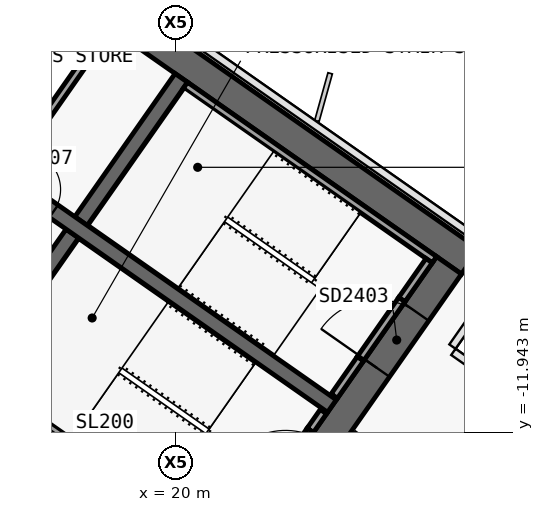
"""IFC4 building model, lengths in metres.
Left out: names, types, materials, properties, quantities, classifications, styles, units other than length and angle.
Written with IfcOpenShell. Run it as: python <this file> out.ifc"""

import sys

from ifc_helpers import new_model, si_unit, direction, frame, frame_2d, origin, place, context, subcontext, project, spatial, polyline, rectangle, outline, extrude, element, fill, save


model = new_model("IFC4")
c1 = context("Model", 3, precision=1e-05, world=origin(), true_north=direction((0.0, 1.0)))
c2 = subcontext(c1, "Body", "Model", "MODEL_VIEW")
j1 = project(units=[si_unit("LENGTHUNIT", "METRE"), si_unit("PLANEANGLEUNIT", "RADIAN")], contexts=[c1])
p1 = place(None, origin())
s1 = spatial("IfcSite", under=j1, at=p1, CompositionType="ELEMENT")
p2 = place(p1, origin())
s2 = spatial("IfcBuilding", under=s1, at=p2, CompositionType="ELEMENT")
p3 = place(p2, frame((0.0, 0.0, 135.9)))
s3 = spatial("IfcBuildingStorey", under=s2, at=p3, CompositionType="ELEMENT", Elevation=135.9)
p4 = place(p3, frame((-0.029, 11.984, 0.0), z_axis=(0.0, 0.0, 1.0), x_axis=(0.819151382952, -0.573577380837, 0.0)))
e1 = element("IfcWall", 1, at=p4, inside=s3, PredefinedType="SHEAR", context=c2, shape_type="SweptSolid", body=[
    extrude(outline(polyline([(33.898, 0.4), (-0.0, 0.4), (0.56, -0.4), (33.898, -0.4), (33.898, 0.4)])), origin(), (0.0, 0.0, 1.0), 3.9),
])
p5 = place(p3, frame((-0.029, -0.712, 0.0), z_axis=(0.0, 0.0, 1.0), x_axis=(0.819151758019, -0.573576845187, 0.0)))
e2 = element("IfcWall", 2, at=p5, inside=s3, PredefinedType="SHEAR", context=c2, shape_type="SweptSolid", body=[
    extrude(outline(polyline([(26.616, 0.4), (-0.0, 0.4), (0.56, -0.4), (26.616, -0.4), (26.616, 0.4)])), origin(), (0.0, 0.0, 1.0), 3.9),
])
p6 = place(p5, frame((1.166, 0.0, 0.0)))
e3 = element("IfcOpeningElement", 3, at=p6, cuts=e2, PredefinedType="OPENING", context=c2, shape_type="SweptSolid", body=[
    extrude(rectangle(XDim=1.5, YDim=2.1, at=frame_2d((0.75, 1.05))), frame((0.0, 0.41, 0.0), z_axis=(0.0, -1.0, 0.0), x_axis=(1.0, 0.0, 0.0)), (0.0, 0.0, 1.0), 0.82),
])
p7 = place(p5, frame((12.366, 0.0, 0.0)))
e4 = element("IfcOpeningElement", 4, at=p7, cuts=e2, PredefinedType="OPENING", context=c2, shape_type="SweptSolid", body=[
    extrude(rectangle(XDim=1.5, YDim=2.1, at=frame_2d((0.75, 1.05))), frame((0.0, 0.41, 0.0), z_axis=(0.0, -1.0, 0.0), x_axis=(1.0, 0.0, 0.0)), (0.0, 0.0, 1.0), 0.82),
])
p8 = place(p3, frame((21.675, -15.421, 0.0), z_axis=(0.0, 0.0, 1.0), x_axis=(0.573581815061, 0.819148278049, 0.0)))
e5 = element("IfcWall", 5, at=p8, inside=s3, PredefinedType="SHEAR", context=c2, shape_type="SweptSolid", body=[
    extrude(outline(polyline([(9.6, 0.4), (0.0, 0.4), (0.0, -0.4), (9.6, -0.4), (9.6, 0.4)])), origin(), (0.0, 0.0, 1.0), 3.9),
])
p9 = place(p8, frame((6.3, 0.0, 0.0)))
e6 = element("IfcOpeningElement", 6, at=p9, cuts=e5, PredefinedType="OPENING", context=c2, shape_type="SweptSolid", body=[
    extrude(rectangle(XDim=1.8, YDim=2.1, at=frame_2d((0.9, 1.05))), frame((0.0, 0.41, 0.0), z_axis=(0.0, -1.0, 0.0), x_axis=(1.0, 0.0, 0.0)), (0.0, 0.0, 1.0), 0.82),
])
p10 = place(p8, frame((2.1, 0.0, 0.0)))
e7 = element("IfcOpeningElement", 7, at=p10, cuts=e5, PredefinedType="OPENING", context=c2, shape_type="SweptSolid", body=[
    extrude(rectangle(XDim=1.8, YDim=2.1, at=frame_2d((0.9, 1.05))), frame((0.0, 0.41, 0.0), z_axis=(0.0, -1.0, 0.0), x_axis=(1.0, 0.0, 0.0)), (0.0, 0.0, 1.0), 0.82),
])
p11 = place(p3, frame((14.63, -10.488, 0.0), z_axis=(0.0, 0.0, 1.0), x_axis=(0.573611936273, 0.819127185829, 0.0)))
e8 = element("IfcWall", 8, at=p11, inside=s3, PredefinedType="SHEAR", context=c2, shape_type="SweptSolid", body=[
    extrude(outline(polyline([(0.0, 0.2), (0.0, -0.2), (4.6, -0.2), (4.6, 0.2), (0.0, 0.2)])), origin(), (0.0, 0.0, 1.0), 3.9),
])
p12 = place(p3, frame((17.498, -6.392, 0.0), z_axis=(0.0, 0.0, 1.0), x_axis=(0.573611936273, 0.819127185829, 0.0)))
e9 = element("IfcWall", 9, at=p12, inside=s3, PredefinedType="SHEAR", context=c2, shape_type="SweptSolid", body=[
    extrude(outline(polyline([(4.6, -0.2), (4.6, 0.2), (0.0, 0.2), (0.0, -0.2), (4.6, -0.2)])), origin(), (0.0, 0.0, 1.0), 3.9),
])
p13 = place(p3, frame((2.638, 3.768, 0.0), z_axis=(0.0, 0.0, 1.0), x_axis=(0.81915267502, -0.573575535572, 0.0)))
e10 = element("IfcWall", 10, at=p13, inside=s3, PredefinedType="SHEAR", context=c2, shape_type="SweptSolid", body=[
    extrude(outline(polyline([(0.0, 0.2), (0.0, -0.2), (26.2, -0.2), (26.2, 0.2), (0.0, 0.2)])), origin(), (0.0, 0.0, 1.0), 3.9),
])
p14 = place(p13, frame((9.637, 0.0, 0.0)))
e11 = element("IfcOpeningElement", 11, at=p14, cuts=e10, PredefinedType="OPENING", context=c2, shape_type="SweptSolid", body=[
    extrude(rectangle(XDim=1.2, YDim=2.1, at=frame_2d((0.6, 1.05))), frame((0.0, 0.21, 0.0), z_axis=(0.0, -1.0, 0.0), x_axis=(1.0, 0.0, 0.0)), (0.0, 0.0, 1.0), 0.42),
])
p15 = place(p13, frame((11.812, 0.0, 0.0)))
e12 = element("IfcOpeningElement", 12, at=p15, cuts=e10, PredefinedType="OPENING", context=c2, shape_type="SweptSolid", body=[
    extrude(rectangle(XDim=1.2, YDim=2.1, at=frame_2d((0.6, 1.05))), frame((0.0, 0.21, 0.0), z_axis=(0.0, -1.0, 0.0), x_axis=(1.0, 0.0, 0.0)), (0.0, 0.0, 1.0), 0.42),
])
p16 = place(p13, frame((13.988, 0.0, 0.0)))
e13 = element("IfcOpeningElement", 13, at=p16, cuts=e10, PredefinedType="OPENING", context=c2, shape_type="SweptSolid", body=[
    extrude(rectangle(XDim=1.2, YDim=2.1, at=frame_2d((0.6, 1.05))), frame((0.0, 0.21, 0.0), z_axis=(0.0, -1.0, 0.0), x_axis=(1.0, 0.0, 0.0)), (0.0, 0.0, 1.0), 0.42),
])
p17 = place(p13, frame((16.262, 0.0, 0.0)))
e14 = element("IfcOpeningElement", 14, at=p17, cuts=e10, PredefinedType="OPENING", context=c2, shape_type="SweptSolid", body=[
    extrude(rectangle(XDim=1.0, YDim=2.1, at=frame_2d((0.5, 1.05))), frame((0.0, 0.21, 0.0), z_axis=(0.0, -1.0, 0.0), x_axis=(1.0, 0.0, 0.0)), (0.0, 0.0, 1.0), 0.42),
])
p18 = place(p3, frame((15.594, -5.059, 0.0), z_axis=(0.0, 0.0, 1.0), x_axis=(0.573540709186, 0.819177059558, 0.0)))
e15 = element("IfcWall", 15, at=p18, inside=s3, PredefinedType="SOLIDWALL", context=c2, shape_type="SweptSolid", body=[
    extrude(rectangle(XDim=4.6, YDim=0.2, at=frame_2d((2.3, 0.0))), origin(), (0.0, 0.0, 1.0), 3.9),
])
p19 = place(p3, frame((20.243, -2.821, 0.0), z_axis=(0.0, 0.0, 1.0), x_axis=(0.819141584393, -0.57359137434, 0.0)))
e16 = element("IfcWall", 16, at=p19, inside=s3, PredefinedType="SOLIDWALL", context=c2, shape_type="SweptSolid", body=[
    extrude(rectangle(XDim=8.0, YDim=0.2, at=frame_2d((4.0, 0.0))), origin(), (0.0, 0.0, 1.0), 3.62),
])
p20 = place(p3, frame((24.162, -10.998, 0.0), z_axis=(0.0, 0.0, 1.0), x_axis=(0.573612502218, 0.819126789514, 0.0)))
e17 = element("IfcWall", 17, at=p20, inside=s3, PredefinedType="SOLIDWALL", context=c2, shape_type="SweptSolid", body=[
    extrude(rectangle(XDim=1.2, YDim=0.2, at=frame_2d((0.6, 0.0))), origin(), (0.0, 0.0, 1.0), 3.62),
])
p21 = place(p3, frame((25.94, -8.458, 0.0), z_axis=(0.0, 0.0, 1.0), x_axis=(0.573619628835, 0.819121798889, 0.0)))
e18 = element("IfcWall", 18, at=p21, inside=s3, PredefinedType="SOLIDWALL", context=c2, shape_type="SweptSolid", body=[
    extrude(rectangle(XDim=1.25, YDim=0.2, at=frame_2d((0.625, 0.0))), origin(), (0.0, 0.0, 1.0), 3.62),
])
p22 = place(p3, frame((24.85, -10.014, 2.15), z_axis=(0.0, 0.0, 1.0), x_axis=(0.573505465124, 0.819201734296, 0.0)))
e19 = element("IfcWall", 19, at=p22, inside=s3, PredefinedType="SOLIDWALL", context=c2, shape_type="SweptSolid", body=[
    extrude(rectangle(XDim=1.9, YDim=0.2, at=frame_2d((0.95, 0.0))), origin(), (0.0, 0.0, 1.0), 1.47),
])
p23 = place(p3, frame((14.851, -10.521, 0.0), z_axis=(0.0, 0.0, 1.0), x_axis=(0.819141584393, -0.57359137434, 0.0)))
e20 = element("IfcWall", 20, at=p23, inside=s3, PredefinedType="SOLIDWALL", context=c2, shape_type="SweptSolid", body=[
    extrude(rectangle(XDim=8.0, YDim=0.2, at=frame_2d((4.0, 0.0))), origin(), (0.0, 0.0, 1.0), 3.62),
])
p24 = place(p3, frame((23.531, -11.898, 0.0), z_axis=(0.0, 0.0, 1.0), x_axis=(0.573708088123, 0.819059844958, 0.0)))
e21 = element("IfcWall", 21, at=p24, inside=s3, PredefinedType="SOLIDWALL", context=c2, shape_type="SweptSolid", body=[
    extrude(rectangle(XDim=0.6, YDim=0.2, at=frame_2d((0.3, 0.0))), origin(), (0.0, 0.0, 1.0), 3.62),
])
p25 = place(p3, frame((22.441, -13.455, 2.15), z_axis=(0.0, 0.0, 1.0), x_axis=(0.573591692345, 0.819141361715, 0.0)))
e22 = element("IfcWall", 22, at=p25, inside=s3, PredefinedType="SOLIDWALL", context=c2, shape_type="SweptSolid", body=[
    extrude(rectangle(XDim=1.9, YDim=0.2, at=frame_2d((0.95, 0.0))), origin(), (0.0, 0.0, 1.0), 1.47),
])
p26 = place(p3, frame((20.513, -17.781, 0.0), z_axis=(0.0, 0.0, 1.0), x_axis=(-0.81916437852, 0.57355882084, 0.0)))
e23 = element("IfcWall", 23, at=p26, inside=s3, PredefinedType="PARTITIONING", context=c2, shape_type="SweptSolid", body=[
    extrude(rectangle(XDim=18.002, YDim=0.15, at=frame_2d((9.001, 0.0))), origin(), (0.0, 0.0, 1.0), 3.0),
])
p27 = place(p26, frame((8.201, 0.0, 0.0)))
e24 = element("IfcOpeningElement", 24, at=p27, cuts=e23, PredefinedType="OPENING", context=c2, shape_type="SweptSolid", body=[
    extrude(rectangle(XDim=1.6, YDim=2.1, at=frame_2d((0.8, 1.05))), frame((0.0, 0.085, 0.0), z_axis=(0.0, -1.0, 0.0), x_axis=(1.0, 0.0, 0.0)), (0.0, 0.0, 1.0), 0.17),
])
p28 = place(p3, frame((18.503, -20.648, 0.0), z_axis=(0.0, 0.0, 1.0), x_axis=(-0.819154173185, 0.573573395961, 0.0)))
e25 = element("IfcWall", 25, at=p28, inside=s3, PredefinedType="PARTITIONING", context=c2, shape_type="SweptSolid", body=[
    extrude(rectangle(XDim=18.0, YDim=0.1, at=frame_2d((9.0, 0.0))), origin(), (0.0, 0.0, 1.0), 3.0),
])
p29 = place(p28, frame((8.55, 0.0, 0.0)))
e26 = element("IfcOpeningElement", 26, at=p29, cuts=e25, PredefinedType="OPENING", context=c2, shape_type="SweptSolid", body=[
    extrude(rectangle(XDim=0.9, YDim=2.1, at=frame_2d((0.45, 1.05))), frame((0.0, 0.06, 0.0), z_axis=(0.0, -1.0, 0.0), x_axis=(1.0, 0.0, 0.0)), (0.0, 0.0, 1.0), 0.12),
])
p30 = place(p17, origin())
e27 = element("IfcDoor", 27, at=p30, inside=s3, OperationType="SINGLE_SWING_RIGHT", PredefinedType="DOOR", context=c2, shape_type="SweptSolid", body=[
    extrude(rectangle(XDim=1.0, YDim=2.1, at=frame_2d((0.5, 1.05))), frame((0.0, 0.025, 0.0), z_axis=(0.0, -1.0, 0.0), x_axis=(1.0, 0.0, 0.0)), (0.0, 0.0, 1.0), 0.05),
])
fill(e14, e27)
p31 = place(p9, origin())
e28 = element("IfcDoor", 28, at=p31, inside=s3, OperationType="DOUBLE_DOOR_SINGLE_SWING", PredefinedType="DOOR", context=c2, shape_type="SweptSolid", body=[
    extrude(rectangle(XDim=1.8, YDim=2.1, at=frame_2d((0.9, 1.05))), frame((0.0, 0.025, 0.0), z_axis=(0.0, -1.0, 0.0), x_axis=(1.0, 0.0, 0.0)), (0.0, 0.0, 1.0), 0.05),
])
fill(e6, e28)
save(model, sys.argv[1])
